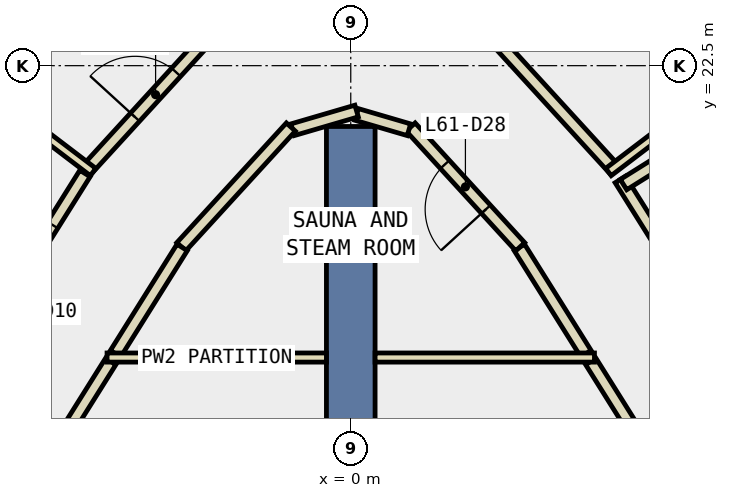
"""IFC4 building model, lengths in metres.
Left out: names, types, materials, properties, quantities, classifications, styles, units other than length and angle.
Written with IfcOpenShell. Run it as: python <this file> out.ifc"""

import sys

from ifc_helpers import new_model, si_unit, direction, frame, frame_2d, origin, place, context, subcontext, project, spatial, rectangle, extrude, element, fill, save


model = new_model("IFC4")
c1 = context("Model", 3, precision=1e-05, world=origin(), true_north=direction((0.0, 1.0)))
c2 = subcontext(c1, "Body", "Model", "MODEL_VIEW")
j1 = project(units=[si_unit("LENGTHUNIT", "METRE"), si_unit("PLANEANGLEUNIT", "RADIAN")], contexts=[c1])
p1 = place(None, origin())
s1 = spatial("IfcSite", under=j1, at=p1, CompositionType="ELEMENT")
p2 = place(p1, origin())
s2 = spatial("IfcBuilding", under=s1, at=p2, CompositionType="ELEMENT")
p3 = place(p2, frame((0.0, 0.0, 266.6)))
s3 = spatial("IfcBuildingStorey", under=s2, at=p3, CompositionType="ELEMENT", Elevation=266.6)
p4 = place(p3, frame((0.0, 12.5, -0.34), z_axis=(0.0, 0.0, 1.0), x_axis=(0.0, 1.0, 0.0)))
e1 = element("IfcWall", 1, at=p4, inside=s3, PredefinedType="SHEAR", context=c2, shape_type="SweptSolid", body=[
    extrude(rectangle(XDim=9.0, YDim=0.8, at=frame_2d((4.5, 0.0))), origin(), (0.0, 0.0, 1.0), 3.6),
])
for number, where, z_axis, x_axis in (
    (2, (5.863, 14.583, 0.0), (0.0, 0.0, 1.0), (-0.531, 0.847, 0.0)),
    (3, (-3.948, 17.636, 0.0), (0.0, 0.0, 1.0), (-0.531, -0.847, 0.0)),
):
    element("IfcWall", number, at=place(p3, frame(where, z_axis=z_axis, x_axis=x_axis)), inside=s3, PredefinedType="PARTITIONING", context=c2, shape_type="SweptSolid", body=[
        extrude(rectangle(XDim=3.604, YDim=0.2, at=frame_2d((1.802, 0.0))), origin(), (0.0, 0.0, 1.0), 3.26),
    ])
p5 = place(p3, frame((3.868, 17.764, 0.0), z_axis=(0.0, 0.0, 1.0), x_axis=(-0.531062870102, 0.847332418829, 0.0)))
e4 = element("IfcWall", 4, at=p5, inside=s3, PredefinedType="PARTITIONING", context=c2, shape_type="SweptSolid", body=[
    extrude(rectangle(XDim=2.062, YDim=0.2, at=frame_2d((1.031, 0.0))), origin(), (0.0, 0.0, 1.0), 3.26),
])
p6 = place(p3, frame((2.787, 19.522, 0.0), z_axis=(0.0, 0.0, 1.0), x_axis=(-0.675132105979, 0.73769684795, 0.0)))
e5 = element("IfcWall", 5, at=p6, inside=s3, PredefinedType="PARTITIONING", context=c2, shape_type="SweptSolid", body=[
    extrude(rectangle(XDim=2.669, YDim=0.2, at=frame_2d((1.334, 0.0))), origin(), (0.0, 0.0, 1.0), 3.26),
])
p7 = place(p6, frame((0.835, 0.0, 0.0)))
e6 = element("IfcOpeningElement", 6, at=p7, cuts=e5, PredefinedType="OPENING", context=c2, shape_type="SweptSolid", body=[
    extrude(rectangle(XDim=1.0, YDim=2.1, at=frame_2d((0.5, 1.05))), frame((0.0, 0.11, 0.0), z_axis=(0.0, -1.0, 0.0), x_axis=(1.0, 0.0, 0.0)), (0.0, 0.0, 1.0), 0.22),
])
p8 = place(p3, frame((0.957, 21.446, 0.0), z_axis=(0.0, 0.0, 1.0), x_axis=(-0.959758875404, 0.28082539252, 0.0)))
e7 = element("IfcWall", 7, at=p8, inside=s3, PredefinedType="PARTITIONING", context=c2, shape_type="SweptSolid", body=[
    extrude(rectangle(XDim=0.897, YDim=0.2, at=frame_2d((0.449, 0.0))), origin(), (0.0, 0.0, 1.0), 3.26),
])
p9 = place(p3, frame((0.096, 21.754, 0.0), z_axis=(0.0, 0.0, 1.0), x_axis=(-0.959817848073, -0.280623766849, 0.0)))
e8 = element("IfcWall", 8, at=p9, inside=s3, PredefinedType="PARTITIONING", context=c2, shape_type="SweptSolid", body=[
    extrude(rectangle(XDim=1.097, YDim=0.2, at=frame_2d((0.549, 0.0))), origin(), (0.0, 0.0, 1.0), 3.26),
])
p10 = place(p3, frame((-0.985, 21.491, 0.0), z_axis=(0.0, 0.0, 1.0), x_axis=(-0.675132105979, -0.73769684795, 0.0)))
e9 = element("IfcWall", 9, at=p10, inside=s3, PredefinedType="PARTITIONING", context=c2, shape_type="SweptSolid", body=[
    extrude(rectangle(XDim=2.669, YDim=0.2, at=frame_2d((1.334, 0.0))), origin(), (0.0, 0.0, 1.0), 3.26),
])
p11 = place(p3, frame((-2.773, 19.511, 0.0), z_axis=(0.0, 0.0, 1.0), x_axis=(-0.531062870102, -0.847332418829, 0.0)))
e10 = element("IfcWall", 10, at=p11, inside=s3, PredefinedType="PARTITIONING", context=c2, shape_type="SweptSolid", body=[
    extrude(rectangle(XDim=2.062, YDim=0.2, at=frame_2d((1.031, 0.0))), origin(), (0.0, 0.0, 1.0), 3.26),
])
p12 = place(p3, frame((4.433, 20.628, 0.0), z_axis=(0.0, 0.0, 1.0), x_axis=(0.531135189756, -0.84728708842, 0.0)))
e11 = element("IfcWall", 11, at=p12, inside=s3, PredefinedType="PARTITIONING", context=c2, shape_type="SweptSolid", body=[
    extrude(rectangle(XDim=2.799, YDim=0.2, at=frame_2d((1.4, 0.0))), origin(), (0.0, 0.0, 1.0), 3.26),
])
p13 = place(p3, frame((-4.335, 20.793, 0.0), z_axis=(0.0, 0.0, 1.0), x_axis=(0.675074517272, 0.737749548377, 0.0)))
e12 = element("IfcWall", 12, at=p13, inside=s3, PredefinedType="PARTITIONING", context=c2, shape_type="SweptSolid", body=[
    extrude(rectangle(XDim=3.334, YDim=0.2, at=frame_2d((1.667, 0.0))), origin(), (0.0, 0.0, 1.0), 3.26),
])
p14 = place(p13, frame((1.167, 0.0, 0.0)))
e13 = element("IfcOpeningElement", 13, at=p14, cuts=e12, PredefinedType="OPENING", context=c2, shape_type="SweptSolid", body=[
    extrude(rectangle(XDim=1.0, YDim=2.1, at=frame_2d((0.5, 1.05))), frame((0.0, 0.11, 0.0), z_axis=(0.0, -1.0, 0.0), x_axis=(1.0, 0.0, 0.0)), (0.0, 0.0, 1.0), 0.22),
])
p15 = place(p3, frame((2.084, 23.253, 0.0), z_axis=(0.0, 0.0, 1.0), x_axis=(0.675074517272, -0.737749548377, 0.0)))
e14 = element("IfcWall", 14, at=p15, inside=s3, PredefinedType="PARTITIONING", context=c2, shape_type="SweptSolid", body=[
    extrude(rectangle(XDim=3.334, YDim=0.2, at=frame_2d((1.667, 0.0))), origin(), (0.0, 0.0, 1.0), 3.26),
])
p16 = place(p3, frame((-5.965, 18.185, 0.0), z_axis=(0.0, 0.0, 1.0), x_axis=(0.531256372055, 0.847211111324, 0.0)))
e15 = element("IfcWall", 15, at=p16, inside=s3, PredefinedType="PARTITIONING", context=c2, shape_type="SweptSolid", body=[
    extrude(rectangle(XDim=3.0, YDim=0.2, at=frame_2d((1.5, 0.0))), origin(), (0.0, 0.0, 1.0), 3.26),
])
p17 = place(p16, frame((1.0, 0.0, 0.0)))
e16 = element("IfcOpeningElement", 16, at=p17, cuts=e15, PredefinedType="OPENING", context=c2, shape_type="SweptSolid", body=[
    extrude(rectangle(XDim=1.0, YDim=2.1, at=frame_2d((0.5, 1.05))), frame((0.0, 0.11, 0.0), z_axis=(0.0, -1.0, 0.0), x_axis=(1.0, 0.0, 0.0)), (0.0, 0.0, 1.0), 0.22),
])
p18 = place(p3, frame((-4.008, 17.7, 0.0), z_axis=(0.0, 0.0, 1.0), x_axis=(1.0, 0.0, 0.0)))
e17 = element("IfcWall", 17, at=p18, inside=s3, PredefinedType="PARTITIONING", context=c2, shape_type="SweptSolid", body=[
    extrude(rectangle(XDim=3.608, YDim=0.15, at=frame_2d((1.804, 0.0))), origin(), (0.0, 0.0, 1.0), 3.26),
])
p19 = place(p3, frame((6.604, 21.871, 0.0), z_axis=(0.0, 0.0, 1.0), x_axis=(-0.847377617561, -0.530990746866, 0.0)))
e18 = element("IfcWall", 18, at=p19, inside=s3, PredefinedType="PARTITIONING", context=c2, shape_type="SweptSolid", body=[
    extrude(rectangle(XDim=2.499, YDim=0.2, at=frame_2d((1.25, 0.0))), origin(), (0.0, 0.0, 1.0), 3.26),
])
for number, where, z_axis, x_axis in (
    (19, (4.238, 20.751, 0.0), (0.0, 0.0, 1.0), (0.796, 0.606, 0.0)),
    (20, (-4.238, 20.751, 0.0), (0.0, 0.0, 1.0), (-0.796, 0.606, 0.0)),
):
    element("IfcWall", number, at=place(p3, frame(where, z_axis=z_axis, x_axis=x_axis)), inside=s3, PredefinedType="PARTITIONING", context=c2, shape_type="SweptSolid", body=[
        extrude(rectangle(XDim=4.604, YDim=0.15, at=frame_2d((2.302, 0.0))), origin(), (0.0, 0.0, 1.0), 3.26),
    ])
p20 = place(p3, frame((0.4, 17.7, 0.0), z_axis=(0.0, 0.0, 1.0), x_axis=(1.0, 0.0, 0.0)))
e21 = element("IfcWall", 21, at=p20, inside=s3, PredefinedType="PARTITIONING", context=c2, shape_type="SweptSolid", body=[
    extrude(rectangle(XDim=3.608, YDim=0.15, at=frame_2d((1.804, 0.0))), origin(), (0.0, 0.0, 1.0), 3.26),
])
p21 = place(p17, origin())
e22 = element("IfcDoor", 22, at=p21, inside=s3, OperationType="SINGLE_SWING_LEFT", PredefinedType="DOOR", context=c2, shape_type="SweptSolid", body=[
    extrude(rectangle(XDim=1.0, YDim=2.1, at=frame_2d((0.5, 1.05))), frame((0.0, 0.025, 0.0), z_axis=(0.0, -1.0, 0.0), x_axis=(1.0, 0.0, 0.0)), (0.0, 0.0, 1.0), 0.05),
])
fill(e16, e22)
p22 = place(p14, origin())
e23 = element("IfcDoor", 23, at=p22, inside=s3, OperationType="SINGLE_SWING_LEFT", PredefinedType="DOOR", context=c2, shape_type="SweptSolid", body=[
    extrude(rectangle(XDim=1.0, YDim=2.1, at=frame_2d((0.5, 1.05))), frame((0.0, 0.025, 0.0), z_axis=(0.0, -1.0, 0.0), x_axis=(1.0, 0.0, 0.0)), (0.0, 0.0, 1.0), 0.05),
])
fill(e13, e23)
p23 = place(p7, origin())
e24 = element("IfcDoor", 24, at=p23, inside=s3, OperationType="SINGLE_SWING_LEFT", PredefinedType="DOOR", context=c2, shape_type="SweptSolid", body=[
    extrude(rectangle(XDim=1.0, YDim=2.1, at=frame_2d((0.5, 1.05))), frame((0.0, 0.025, 0.0), z_axis=(0.0, -1.0, 0.0), x_axis=(1.0, 0.0, 0.0)), (0.0, 0.0, 1.0), 0.05),
])
fill(e6, e24)
save(model, sys.argv[1])
